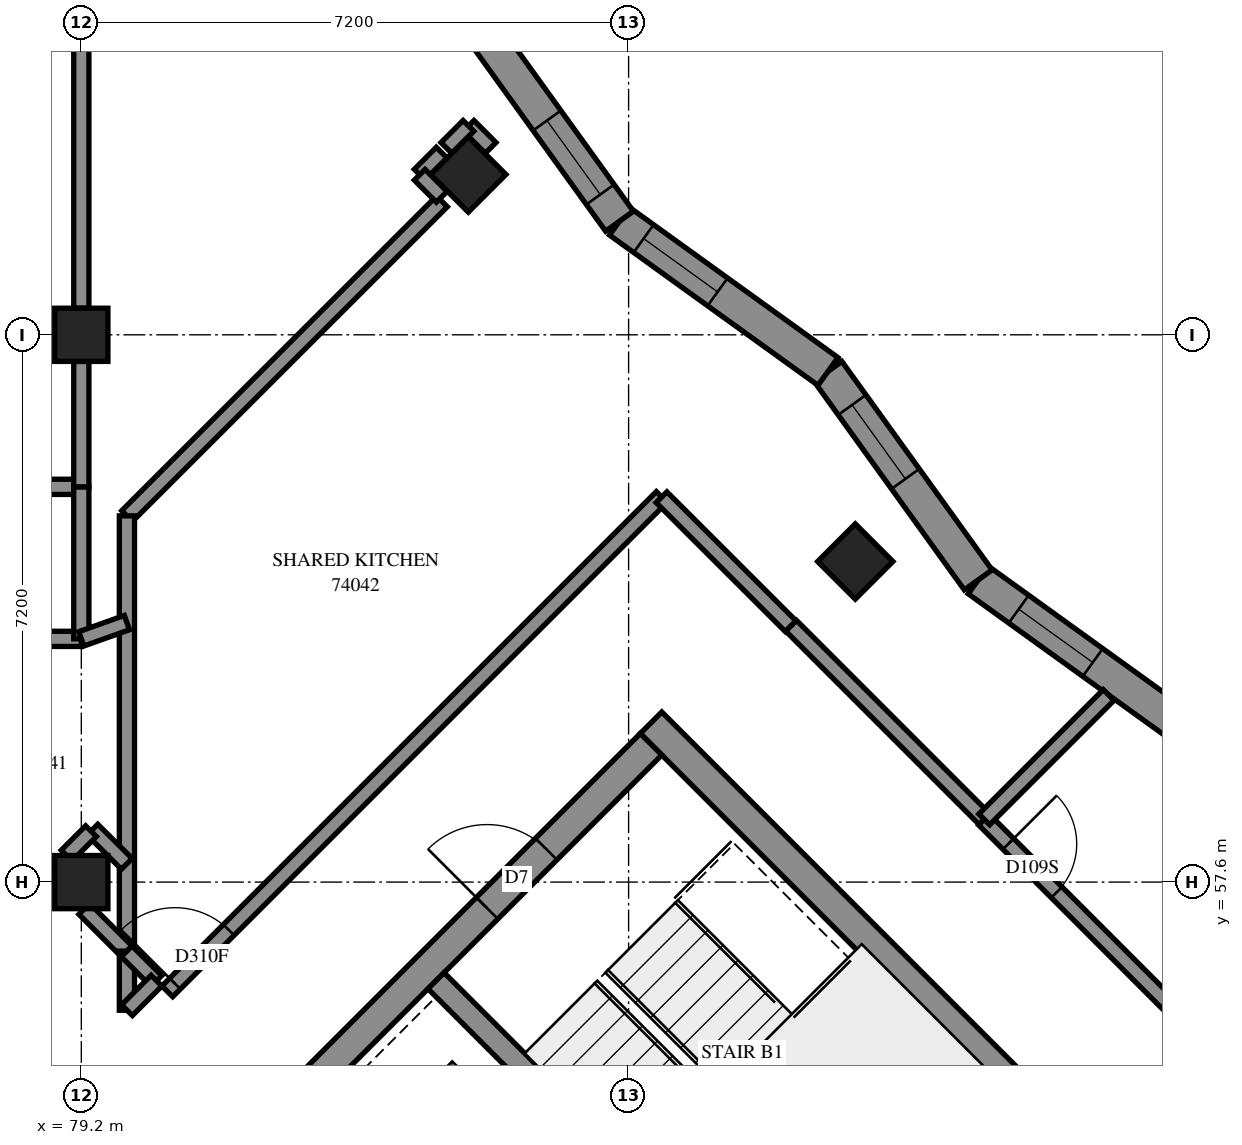
"""IFC4 building model, lengths in metres.
Left out: names, types, materials, properties, quantities, classifications, styles, units other than length and angle.
Written with IfcOpenShell. Run it as: python <this file> out.ifc"""

import sys

from ifc_helpers import new_model, si_unit, direction, frame, frame_2d, origin, origin_2d, place, context, subcontext, project, spatial, polyline, rectangle, outline, extrude, element, fill, save


model = new_model("IFC4")
c1 = context("Model", 3, precision=1e-05, world=origin(), true_north=direction((0.0, 1.0)))
c2 = subcontext(c1, "Body", "Model", "MODEL_VIEW")
j1 = project(units=[si_unit("LENGTHUNIT", "METRE"), si_unit("PLANEANGLEUNIT", "RADIAN")], contexts=[c1])
p1 = place(None, origin())
s1 = spatial("IfcSite", under=j1, at=p1, CompositionType="ELEMENT")
p2 = place(p1, origin())
s2 = spatial("IfcBuilding", under=s1, at=p2, CompositionType="ELEMENT")
p3 = place(p2, frame((0.0, 0.0, 271.0)))
s3 = spatial("IfcBuildingStorey", under=s2, at=p3, CompositionType="ELEMENT", Elevation=271.0)
for number, where, z_axis, x_axis in (
    (1, (79.2, 57.6, 0.0), (0.0, 0.0, 1.0), (1.0, 0.0, 0.0)),
    (2, (79.2, 64.8, 0.0), (0.0, 0.0, 1.0), (1.0, 0.0, 0.0)),
    (3, (84.291, 66.909, 0.0), (0.0, 0.0, 1.0), (0.707, -0.707, 0.0)),
    (4, (89.382, 61.818, 0.0), (0.0, 0.0, 1.0), (0.707, -0.707, 0.0)),
):
    element("IfcColumn", number, at=place(p3, frame(where, z_axis=z_axis, x_axis=x_axis)), inside=s3, PredefinedType="COLUMN", context=c2, shape_type="SweptSolid", body=[
        extrude(rectangle(XDim=0.7, YDim=0.7, at=origin_2d()), origin(), (0.0, 0.0, 1.0), 3.1),
    ])
p4 = place(p3, frame((86.695, 59.696, -0.3), z_axis=(0.0, 0.0, 1.0), x_axis=(0.7071100706, -0.7071034917, 0.0)))
e5 = element("IfcWall", 5, at=p4, inside=s3, PredefinedType="SHEAR", context=c2, shape_type="SweptSolid", body=[
    extrude(rectangle(XDim=15.2, YDim=0.4, at=frame_2d((7.6, 0.0))), origin(), (0.0, 0.0, 1.0), 2.7),
])
p5 = place(p4, frame((10.4, 0.0, 0.3)))
e6 = element("IfcOpeningElement", 6, at=p5, cuts=e5, PredefinedType="OPENING", context=c2, shape_type="SweptSolid", body=[
    extrude(rectangle(XDim=0.8, YDim=2.1, at=frame_2d((0.4, 1.05))), frame((0.0, 0.21, 0.0), z_axis=(0.0, -1.0, 0.0), x_axis=(1.0, 0.0, 0.0)), (0.0, 0.0, 1.0), 0.42),
])
p6 = place(p3, frame((76.513, 49.231, -0.3), z_axis=(0.0, 0.0, 1.0), x_axis=(0.7071067812, 0.7071067812, 0.0)))
e7 = element("IfcWall", 7, at=p6, inside=s3, PredefinedType="SHEAR", context=c2, shape_type="SweptSolid", body=[
    extrude(rectangle(XDim=14.4, YDim=0.4, at=frame_2d((7.2, 0.0))), origin(), (0.0, 0.0, 1.0), 2.7),
])
p7 = place(p6, frame((4.55, 0.0, 0.3)))
e8 = element("IfcOpeningElement", 8, at=p7, cuts=e7, PredefinedType="OPENING", context=c2, shape_type="SweptSolid", body=[
    extrude(rectangle(XDim=1.1, YDim=2.1, at=frame_2d((0.55, 1.05))), frame((0.0, 0.21, 0.0), z_axis=(0.0, -1.0, 0.0), x_axis=(1.0, 0.0, 0.0)), (0.0, 0.0, 1.0), 0.42),
])
p8 = place(p6, frame((11.35, 0.0, 0.3)))
e9 = element("IfcOpeningElement", 9, at=p8, cuts=e7, PredefinedType="OPENING", context=c2, shape_type="SweptSolid", body=[
    extrude(rectangle(XDim=1.1, YDim=2.1, at=frame_2d((0.55, 1.05))), frame((0.0, 0.21, 0.0), z_axis=(0.0, -1.0, 0.0), x_axis=(1.0, 0.0, 0.0)), (0.0, 0.0, 1.0), 0.42),
])
p9 = place(p3, frame((83.867, 56.302, 0.0), z_axis=(0.0, 0.0, 1.0), x_axis=(0.7071137256, -0.7070998367, 0.0)))
e10 = element("IfcWall", 10, at=p9, inside=s3, PredefinedType="SOLIDWALL", context=c2, shape_type="SweptSolid", body=[
    extrude(rectangle(XDim=7.2, YDim=0.3, at=frame_2d((3.6, 0.0))), origin(), (0.0, 0.0, 1.0), 3.1),
])
p10 = place(p3, frame((93.742, 59.599, 0.0), z_axis=(0.0, 0.0, 1.0), x_axis=(-0.8113222169, 0.5845992306, 0.0)))
e11 = element("IfcWall", 11, at=p10, inside=s3, PredefinedType="SOLIDWALL", context=c2, shape_type="SweptSolid", body=[
    extrude(outline(polyline([(-0.036, -0.225), (3.344, -0.225), (3.417, 0.225), (0.036, 0.225), (-0.036, -0.225)])), origin(), (0.0, 0.0, 1.0), 3.1),
])
p11 = place(p10, frame((1.523, 0.0, 0.45)))
e12 = element("IfcOpeningElement", 12, at=p11, cuts=e11, PredefinedType="OPENING", context=c2, shape_type="SweptSolid", body=[
    extrude(rectangle(XDim=1.2, YDim=2.55, at=frame_2d((0.6, 1.275))), frame((0.0, 0.235, 0.0), z_axis=(0.0, -1.0, 0.0), x_axis=(1.0, 0.0, 0.0)), (0.0, 0.0, 1.0), 0.47),
])
p12 = place(p3, frame((90.999, 61.575, 0.0), z_axis=(0.0, 0.0, 1.0), x_axis=(-0.5845797599, 0.8113362462, 0.0)))
e13 = element("IfcWall", 13, at=p12, inside=s3, PredefinedType="SOLIDWALL", context=c2, shape_type="SweptSolid", body=[
    extrude(outline(polyline([(0.036, -0.225), (3.417, -0.225), (3.344, 0.225), (-0.036, 0.225), (0.036, -0.225)])), origin(), (0.0, 0.0, 1.0), 3.1),
])
p13 = place(p12, frame((1.638, 0.0, 0.45)))
e14 = element("IfcOpeningElement", 14, at=p13, cuts=e13, PredefinedType="OPENING", context=c2, shape_type="SweptSolid", body=[
    extrude(rectangle(XDim=1.2, YDim=2.55, at=frame_2d((0.6, 1.275))), frame((0.0, 0.235, 0.0), z_axis=(0.0, -1.0, 0.0), x_axis=(1.0, 0.0, 0.0)), (0.0, 0.0, 1.0), 0.47),
])
p14 = place(p3, frame((89.023, 64.318, 0.0), z_axis=(0.0, 0.0, 1.0), x_axis=(-0.8113362462, 0.5845797599, 0.0)))
e15 = element("IfcWall", 15, at=p14, inside=s3, PredefinedType="SOLIDWALL", context=c2, shape_type="SweptSolid", body=[
    extrude(outline(polyline([(-0.036, -0.225), (3.344, -0.225), (3.417, 0.225), (0.036, 0.225), (-0.036, -0.225)])), origin(), (0.0, 0.0, 1.0), 3.1),
])
p15 = place(p14, frame((1.79, 0.0, 0.45)))
e16 = element("IfcOpeningElement", 16, at=p15, cuts=e15, PredefinedType="OPENING", context=c2, shape_type="SweptSolid", body=[
    extrude(rectangle(XDim=1.2, YDim=2.55, at=frame_2d((0.6, 1.275))), frame((0.0, 0.235, 0.0), z_axis=(0.0, -1.0, 0.0), x_axis=(1.0, 0.0, 0.0)), (0.0, 0.0, 1.0), 0.47),
])
p16 = place(p3, frame((86.28, 66.294, 0.0), z_axis=(0.0, 0.0, 1.0), x_axis=(-0.5845992306, 0.8113222169, 0.0)))
e17 = element("IfcWall", 17, at=p16, inside=s3, PredefinedType="SOLIDWALL", context=c2, shape_type="SweptSolid", body=[
    extrude(outline(polyline([(0.036, -0.225), (3.417, -0.225), (3.344, 0.225), (-0.036, 0.225), (0.036, -0.225)])), origin(), (0.0, 0.0, 1.0), 3.1),
])
p17 = place(p16, frame((0.432, 0.0, 0.45)))
e18 = element("IfcOpeningElement", 18, at=p17, cuts=e17, PredefinedType="OPENING", context=c2, shape_type="SweptSolid", body=[
    extrude(rectangle(XDim=1.2, YDim=2.55, at=frame_2d((0.6, 1.275))), frame((0.0, 0.235, 0.0), z_axis=(0.0, -1.0, 0.0), x_axis=(1.0, 0.0, 0.0)), (0.0, 0.0, 1.0), 0.47),
])
p18 = place(p3, frame((80.332, 56.163, 0.0), z_axis=(0.0, 0.0, 1.0), x_axis=(0.7071067812, 0.7071067812, 0.0)))
e19 = element("IfcWall", 19, at=p18, inside=s3, PredefinedType="PARTITIONING", context=c2, shape_type="SweptSolid", body=[
    extrude(rectangle(XDim=9.198, YDim=0.2, at=frame_2d((4.599, 0.0))), origin(), (0.0, 0.0, 1.0), 3.1),
])
p19 = place(p18, frame((0.143, 0.0, 0.0)))
e20 = element("IfcOpeningElement", 20, at=p19, cuts=e19, PredefinedType="OPENING", context=c2, shape_type="SweptSolid", body=[
    extrude(rectangle(XDim=1.0, YDim=2.1, at=frame_2d((0.5, 1.05))), frame((0.0, 0.11, 0.0), z_axis=(0.0, -1.0, 0.0), x_axis=(1.0, 0.0, 0.0)), (0.0, 0.0, 1.0), 0.22),
])
p20 = place(p3, frame((79.2, 65.15, 0.0), z_axis=(0.0, 0.0, 1.0), x_axis=(0.0, 1.0, 0.0)))
e21 = element("IfcWall", 21, at=p20, inside=s3, PredefinedType="PARTITIONING", context=c2, shape_type="SweptSolid", body=[
    extrude(rectangle(XDim=6.5, YDim=0.2, at=frame_2d((3.25, 0.0))), origin(), (0.0, 0.0, 1.0), 3.1),
])
p21 = place(p3, frame((79.802, 62.416, 0.0), z_axis=(0.0, 0.0, 1.0), x_axis=(0.7072775181, 0.7069360031, 0.0)))
e22 = element("IfcWall", 22, at=p21, inside=s3, PredefinedType="PARTITIONING", context=c2, shape_type="SweptSolid", body=[
    extrude(rectangle(XDim=5.856, YDim=0.2, at=frame_2d((2.928, 0.0))), origin(), (0.0, 0.0, 1.0), 3.1),
])
p22 = place(p3, frame((79.8, 56.692, 0.0), z_axis=(0.0, 0.0, 1.0), x_axis=(0.0, 1.0, 0.0)))
e23 = element("IfcWall", 23, at=p22, inside=s3, PredefinedType="PARTITIONING", context=c2, shape_type="SweptSolid", body=[
    extrude(rectangle(XDim=5.726, YDim=0.2, at=frame_2d((2.863, 0.0))), origin(), (0.0, 0.0, 1.0), 3.1),
])
p23 = place(p3, frame((74.402, 62.8, 0.0), z_axis=(0.0, 0.0, 1.0), x_axis=(1.0, 0.0, 0.0)))
e24 = element("IfcWall", 24, at=p23, inside=s3, PredefinedType="PARTITIONING", context=c2, shape_type="SweptSolid", body=[
    extrude(rectangle(XDim=4.798, YDim=0.2, at=frame_2d((2.399, 0.0))), origin(), (0.0, 0.0, 1.0), 3.1),
])
p24 = place(p23, frame((1.766, 0.0, 0.0)))
e25 = element("IfcOpeningElement", 25, at=p24, cuts=e24, PredefinedType="OPENING", context=c2, shape_type="SweptSolid", body=[
    extrude(rectangle(XDim=1.0, YDim=2.1, at=frame_2d((0.5, 1.05))), frame((0.0, 0.11, 0.0), z_axis=(0.0, -1.0, 0.0), x_axis=(1.0, 0.0, 0.0)), (0.0, 0.0, 1.0), 0.22),
])
p25 = place(p3, frame((88.537, 60.973, 0.0), z_axis=(0.0, 0.0, 1.0), x_axis=(0.7071067812, -0.7071067812, 0.0)))
e26 = element("IfcWall", 26, at=p25, inside=s3, PredefinedType="PARTITIONING", context=c2, shape_type="SweptSolid", body=[
    extrude(rectangle(XDim=3.601, YDim=0.2, at=frame_2d((1.8, 0.0))), origin(), (0.0, 0.0, 1.0), 3.1),
])
p26 = place(p3, frame((91.077, 58.421, 0.0), z_axis=(0.0, 0.0, 1.0), x_axis=(0.7068288851, -0.7073845681, 0.0)))
e27 = element("IfcWall", 27, at=p26, inside=s3, PredefinedType="PARTITIONING", context=c2, shape_type="SweptSolid", body=[
    extrude(rectangle(XDim=3.599, YDim=0.2, at=frame_2d((1.8, 0.0))), origin(), (0.0, 0.0, 1.0), 3.1),
])
p27 = place(p26, frame((0.451, 0.0, 0.0)))
e28 = element("IfcOpeningElement", 28, at=p27, cuts=e27, PredefinedType="OPENING", context=c2, shape_type="SweptSolid", body=[
    extrude(rectangle(XDim=0.9, YDim=2.1, at=frame_2d((0.45, 1.05))), frame((0.0, 0.11, 0.0), z_axis=(0.0, -1.0, 0.0), x_axis=(1.0, 0.0, 0.0)), (0.0, 0.0, 1.0), 0.22),
])
p28 = place(p3, frame((76.263, 60.223, 0.0), z_axis=(0.0, 0.0, 1.0), x_axis=(0.7071067812, -0.7071067812, 0.0)))
e29 = element("IfcWall", 29, at=p28, inside=s3, PredefinedType="PARTITIONING", context=c2, shape_type="SweptSolid", body=[
    extrude(rectangle(XDim=3.547, YDim=0.2, at=frame_2d((1.773, 0.0))), origin(), (0.0, 0.0, 1.0), 3.1),
])
p29 = place(p28, frame((1.893, 0.0, 0.0)))
e30 = element("IfcOpeningElement", 30, at=p29, cuts=e29, PredefinedType="OPENING", context=c2, shape_type="SweptSolid", body=[
    extrude(rectangle(XDim=1.0, YDim=2.1, at=frame_2d((0.5, 1.05))), frame((0.0, 0.11, 0.0), z_axis=(0.0, -1.0, 0.0), x_axis=(1.0, 0.0, 0.0)), (0.0, 0.0, 1.0), 0.22),
])
p30 = place(p3, frame((76.262, 60.8, 0.0), z_axis=(0.0, 0.0, 1.0), x_axis=(1.0, 0.0, 0.0)))
e31 = element("IfcWall", 31, at=p30, inside=s3, PredefinedType="PARTITIONING", context=c2, shape_type="SweptSolid", body=[
    extrude(rectangle(XDim=2.938, YDim=0.2, at=frame_2d((1.469, 0.0))), origin(), (0.0, 0.0, 1.0), 3.1),
])
p31 = place(p3, frame((86.833, 62.663, 0.0), z_axis=(0.0, 0.0, 1.0), x_axis=(0.7075233388, -0.706689978, 0.0)))
e32 = element("IfcWall", 32, at=p31, inside=s3, PredefinedType="PARTITIONING", context=c2, shape_type="SweptSolid", body=[
    extrude(rectangle(XDim=2.4, YDim=0.2, at=frame_2d((1.2, 0.0))), origin(), (0.0, 0.0, 1.0), 3.1),
])
p32 = place(p3, frame((91.079, 58.425, 0.0), z_axis=(0.0, 0.0, 1.0), x_axis=(0.7071067812, 0.7071067812, 0.0)))
e33 = element("IfcWall", 33, at=p32, inside=s3, PredefinedType="PARTITIONING", context=c2, shape_type="SweptSolid", body=[
    extrude(rectangle(XDim=2.314, YDim=0.2, at=frame_2d((1.157, 0.0))), origin(), (0.0, 0.0, 1.0), 3.1),
])
p33 = place(p3, frame((79.2, 60.8, 0.0), z_axis=(0.0, 0.0, 1.0), x_axis=(0.0, 1.0, 0.0)))
e34 = element("IfcWall", 34, at=p33, inside=s3, PredefinedType="PARTITIONING", context=c2, shape_type="SweptSolid", body=[
    extrude(rectangle(XDim=2.0, YDim=0.2, at=frame_2d((1.0, 0.0))), origin(), (0.0, 0.0, 1.0), 3.1),
])
p34 = place(p3, frame((79.2, 62.8, 0.0), z_axis=(0.0, 0.0, 1.0), x_axis=(0.0, 1.0, 0.0)))
e35 = element("IfcWall", 35, at=p34, inside=s3, PredefinedType="PARTITIONING", context=c2, shape_type="SweptSolid", body=[
    extrude(rectangle(XDim=1.65, YDim=0.2, at=frame_2d((0.825, 0.0))), origin(), (0.0, 0.0, 1.0), 3.1),
])
p35 = place(p3, frame((79.239, 57.247, 0.0), z_axis=(0.0, 0.0, 1.0), x_axis=(0.7071067812, -0.7071067812, 0.0)))
e36 = element("IfcWall", 36, at=p35, inside=s3, PredefinedType="PARTITIONING", context=c2, shape_type="SweptSolid", body=[
    extrude(rectangle(XDim=0.789, YDim=0.2, at=frame_2d((0.395, 0.0))), origin(), (0.0, 0.0, 1.0), 3.1),
])
p36 = place(p3, frame((79.8, 55.914, 0.0), z_axis=(0.0, 0.0, 1.0), x_axis=(0.0, 1.0, 0.0)))
e37 = element("IfcWall", 37, at=p36, inside=s3, PredefinedType="PARTITIONING", context=c2, shape_type="SweptSolid", body=[
    extrude(rectangle(XDim=0.778, YDim=0.2, at=frame_2d((0.389, 0.0))), origin(), (0.0, 0.0, 1.0), 3.1),
])
p37 = place(p3, frame((79.346, 58.29, 0.0), z_axis=(0.0, 0.0, 1.0), x_axis=(0.7086729034, -0.7055371826, 0.0)))
e38 = element("IfcWall", 38, at=p37, inside=s3, PredefinedType="PARTITIONING", context=c2, shape_type="SweptSolid", body=[
    extrude(rectangle(XDim=0.638, YDim=0.2, at=frame_2d((0.319, 0.0))), origin(), (0.0, 0.0, 1.0), 3.1),
])
p38 = place(p3, frame((79.2, 60.8, 0.0), z_axis=(0.0, 0.0, 1.0), x_axis=(0.9418838915, 0.335938588, 0.0)))
e39 = element("IfcWall", 39, at=p38, inside=s3, PredefinedType="PARTITIONING", context=c2, shape_type="SweptSolid", body=[
    extrude(rectangle(XDim=0.637, YDim=0.2, at=frame_2d((0.319, 0.0))), origin(), (0.0, 0.0, 1.0), 3.1),
])
p39 = place(p3, frame((79.797, 56.689, 0.0), z_axis=(0.0, 0.0, 1.0), x_axis=(0.7071067812, -0.7071067812, 0.0)))
e40 = element("IfcWall", 40, at=p39, inside=s3, PredefinedType="PARTITIONING", context=c2, shape_type="SweptSolid", body=[
    extrude(rectangle(XDim=0.551, YDim=0.2, at=frame_2d((0.276, 0.0))), origin(), (0.0, 0.0, 1.0), 3.1),
])
p40 = place(p3, frame((79.801, 55.915, 0.0), z_axis=(0.0, 0.0, 1.0), x_axis=(0.7071067812, 0.7071067812, 0.0)))
e41 = element("IfcWall", 41, at=p40, inside=s3, PredefinedType="PARTITIONING", context=c2, shape_type="SweptSolid", body=[
    extrude(rectangle(XDim=0.549, YDim=0.2, at=frame_2d((0.274, 0.0))), origin(), (0.0, 0.0, 1.0), 3.1),
])
p41 = place(p3, frame((79.007, 57.949, 0.0), z_axis=(0.0, 0.0, 1.0), x_axis=(0.7071067812, 0.7071067812, 0.0)))
e42 = element("IfcWall", 42, at=p41, inside=s3, PredefinedType="PARTITIONING", context=c2, shape_type="SweptSolid", body=[
    extrude(rectangle(XDim=0.454, YDim=0.2, at=frame_2d((0.227, 0.0))), origin(), (0.0, 0.0, 1.0), 3.1),
])
for number, where, z_axis, x_axis in (
    (43, (84.295, 67.549, 0.0), (0.0, 0.0, 1.0), (0.707, -0.707, 0.0)),
    (44, (83.651, 66.907, 0.0), (0.0, 0.0, 1.0), (0.707, 0.707, 0.0)),
    (45, (83.652, 66.906, 0.0), (0.0, 0.0, 1.0), (0.707, -0.707, 0.0)),
    (46, (84.003, 67.259, 0.0), (0.0, 0.0, 1.0), (0.707, 0.707, 0.0)),
):
    element("IfcWall", number, at=place(p3, frame(where, z_axis=z_axis, x_axis=x_axis)), inside=s3, PredefinedType="PARTITIONING", context=c2, shape_type="SweptSolid", body=[
        extrude(rectangle(XDim=0.41, YDim=0.2, at=frame_2d((0.205, 0.0))), origin(), (0.0, 0.0, 1.0), 3.1),
    ])
p42 = place(p11, origin())
e47 = element("IfcWindow", 47, at=p42, inside=s3, PartitioningType="SINGLE_PANEL", PredefinedType="WINDOW", context=c2, shape_type="SweptSolid", body=[
    extrude(rectangle(XDim=1.2, YDim=2.55, at=frame_2d((0.6, 1.275))), frame((0.0, 0.205, 0.0), z_axis=(0.0, -1.0, 0.0), x_axis=(1.0, 0.0, 0.0)), (0.0, 0.0, 1.0), 0.06),
])
fill(e12, e47)
p43 = place(p13, origin())
e48 = element("IfcWindow", 48, at=p43, inside=s3, PartitioningType="SINGLE_PANEL", PredefinedType="WINDOW", context=c2, shape_type="SweptSolid", body=[
    extrude(rectangle(XDim=1.2, YDim=2.55, at=frame_2d((0.6, 1.275))), frame((0.0, 0.205, 0.0), z_axis=(0.0, -1.0, 0.0), x_axis=(1.0, 0.0, 0.0)), (0.0, 0.0, 1.0), 0.06),
])
fill(e14, e48)
p44 = place(p15, origin())
e49 = element("IfcWindow", 49, at=p44, inside=s3, PartitioningType="SINGLE_PANEL", PredefinedType="WINDOW", context=c2, shape_type="SweptSolid", body=[
    extrude(rectangle(XDim=1.2, YDim=2.55, at=frame_2d((0.6, 1.275))), frame((0.0, 0.205, 0.0), z_axis=(0.0, -1.0, 0.0), x_axis=(1.0, 0.0, 0.0)), (0.0, 0.0, 1.0), 0.06),
])
fill(e16, e49)
p45 = place(p17, origin())
e50 = element("IfcWindow", 50, at=p45, inside=s3, PartitioningType="SINGLE_PANEL", PredefinedType="WINDOW", context=c2, shape_type="SweptSolid", body=[
    extrude(rectangle(XDim=1.2, YDim=2.55, at=frame_2d((0.6, 1.275))), frame((0.0, 0.205, 0.0), z_axis=(0.0, -1.0, 0.0), x_axis=(1.0, 0.0, 0.0)), (0.0, 0.0, 1.0), 0.06),
])
fill(e18, e50)
p46 = place(p8, origin())
e51 = element("IfcDoor", 51, at=p46, inside=s3, OperationType="SINGLE_SWING_LEFT", PredefinedType="DOOR", context=c2, shape_type="SweptSolid", body=[
    extrude(rectangle(XDim=1.1, YDim=2.1, at=frame_2d((0.55, 1.05))), frame((0.0, 0.025, 0.0), z_axis=(0.0, -1.0, 0.0), x_axis=(1.0, 0.0, 0.0)), (0.0, 0.0, 1.0), 0.05),
])
fill(e9, e51)
p47 = place(p19, origin())
e52 = element("IfcDoor", 52, at=p47, inside=s3, OperationType="SINGLE_SWING_LEFT", PredefinedType="DOOR", context=c2, shape_type="SweptSolid", body=[
    extrude(rectangle(XDim=1.0, YDim=2.1, at=frame_2d((0.5, 1.05))), frame((0.0, 0.025, 0.0), z_axis=(0.0, -1.0, 0.0), x_axis=(1.0, 0.0, 0.0)), (0.0, 0.0, 1.0), 0.05),
])
fill(e20, e52)
p48 = place(p27, origin())
e53 = element("IfcDoor", 53, at=p48, inside=s3, OperationType="SINGLE_SWING_RIGHT", PredefinedType="DOOR", context=c2, shape_type="SweptSolid", body=[
    extrude(rectangle(XDim=0.9, YDim=2.1, at=frame_2d((0.45, 1.05))), frame((0.0, 0.025, 0.0), z_axis=(0.0, -1.0, 0.0), x_axis=(1.0, 0.0, 0.0)), (0.0, 0.0, 1.0), 0.05),
])
fill(e28, e53)
save(model, sys.argv[1])
